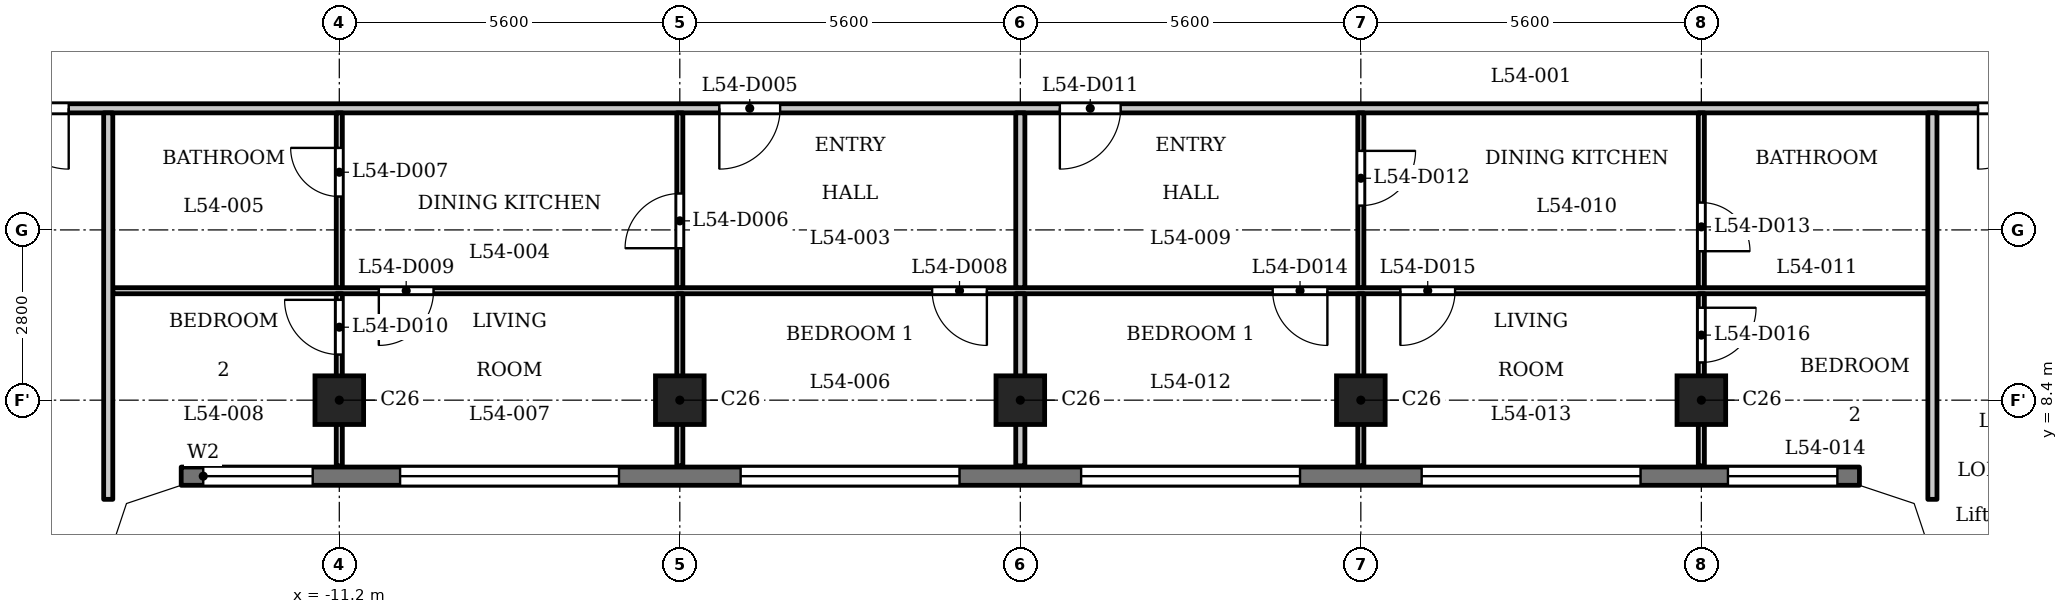
"""IFC4 building model, lengths in metres.
Left out: names, types, materials, properties, quantities, classifications, styles, units other than length and angle.
Written with IfcOpenShell. Run it as: python <this file> out.ifc"""

import sys

from ifc_helpers import new_model, si_unit, direction, frame, frame_2d, origin, origin_2d, place, context, subcontext, project, spatial, polyline, rectangle, outline, extrude, element, fill, save


model = new_model("IFC4")
c1 = context("Model", 3, precision=1e-05, world=origin(), true_north=direction((0.0, 1.0)))
c2 = subcontext(c1, "Body", "Model", "MODEL_VIEW")
j1 = project(units=[si_unit("LENGTHUNIT", "METRE"), si_unit("PLANEANGLEUNIT", "RADIAN")], contexts=[c1])
p1 = place(None, origin())
s1 = spatial("IfcSite", under=j1, at=p1, CompositionType="ELEMENT")
p2 = place(p1, origin())
s2 = spatial("IfcBuilding", under=s1, at=p2, CompositionType="ELEMENT")
p3 = place(p2, frame((0.0, 0.0, 209.9)))
s3 = spatial("IfcBuildingStorey", under=s2, at=p3, CompositionType="ELEMENT", Elevation=209.9)
for number, where, z_axis, x_axis in (
    (1, (-11.2, 8.4, 0.0), (0.0, 0.0, 1.0), (1.0, 0.0, 0.0)),
    (2, (-5.6, 8.4, 0.0), (0.0, 0.0, 1.0), (1.0, 0.0, 0.0)),
    (3, (0.0, 8.4, 0.0), (0.0, 0.0, 1.0), (1.0, 0.0, 0.0)),
    (4, (5.6, 8.4, 0.0), (0.0, 0.0, 1.0), (1.0, 0.0, 0.0)),
    (5, (11.2, 8.4, 0.0), (0.0, 0.0, 1.0), (1.0, 0.0, 0.0)),
):
    element("IfcColumn", number, at=place(p3, frame(where, z_axis=z_axis, x_axis=x_axis)), inside=s3, PredefinedType="COLUMN", context=c2, shape_type="SweptSolid", body=[
        extrude(rectangle(XDim=0.8, YDim=0.8, at=origin_2d()), origin(), (0.0, 0.0, 1.0), 3.5),
    ])
p4 = place(p3, frame((-13.8, 7.15, 0.0), z_axis=(0.0, 0.0, 1.0), x_axis=(1.0, 0.0, 0.0)))
e6 = element("IfcWall", 6, at=p4, inside=s3, PredefinedType="SOLIDWALL", context=c2, shape_type="SweptSolid", body=[
    extrude(rectangle(XDim=27.6, YDim=0.3, at=frame_2d((13.8, 0.0))), origin(), (0.0, 0.0, 1.0), 3.2),
])
p5 = place(p4, frame((0.363, 0.0, 0.9)))
e7 = element("IfcOpeningElement", 7, at=p5, cuts=e6, PredefinedType="OPENING", context=c2, shape_type="SweptSolid", body=[
    extrude(rectangle(XDim=1.8, YDim=1.25, at=frame_2d((0.9, 0.625))), frame((0.0, 0.16, 0.0), z_axis=(0.0, -1.0, 0.0), x_axis=(1.0, 0.0, 0.0)), (0.0, 0.0, 1.0), 0.32),
])
p6 = place(p4, frame((3.6, 0.0, 1.2)))
e8 = element("IfcOpeningElement", 8, at=p6, cuts=e6, PredefinedType="OPENING", context=c2, shape_type="SweptSolid", body=[
    extrude(rectangle(XDim=3.6, YDim=0.95, at=frame_2d((1.8, 0.475))), frame((0.0, 0.16, 0.0), z_axis=(0.0, -1.0, 0.0), x_axis=(1.0, 0.0, 0.0)), (0.0, 0.0, 1.0), 0.32),
])
p7 = place(p4, frame((9.2, 0.0, 1.2)))
e9 = element("IfcOpeningElement", 9, at=p7, cuts=e6, PredefinedType="OPENING", context=c2, shape_type="SweptSolid", body=[
    extrude(rectangle(XDim=3.6, YDim=0.95, at=frame_2d((1.8, 0.475))), frame((0.0, 0.16, 0.0), z_axis=(0.0, -1.0, 0.0), x_axis=(1.0, 0.0, 0.0)), (0.0, 0.0, 1.0), 0.32),
])
p8 = place(p4, frame((14.8, 0.0, 1.2)))
e10 = element("IfcOpeningElement", 10, at=p8, cuts=e6, PredefinedType="OPENING", context=c2, shape_type="SweptSolid", body=[
    extrude(rectangle(XDim=3.6, YDim=0.95, at=frame_2d((1.8, 0.475))), frame((0.0, 0.16, 0.0), z_axis=(0.0, -1.0, 0.0), x_axis=(1.0, 0.0, 0.0)), (0.0, 0.0, 1.0), 0.32),
])
p9 = place(p4, frame((20.4, 0.0, 1.2)))
e11 = element("IfcOpeningElement", 11, at=p9, cuts=e6, PredefinedType="OPENING", context=c2, shape_type="SweptSolid", body=[
    extrude(rectangle(XDim=3.6, YDim=0.95, at=frame_2d((1.8, 0.475))), frame((0.0, 0.16, 0.0), z_axis=(0.0, -1.0, 0.0), x_axis=(1.0, 0.0, 0.0)), (0.0, 0.0, 1.0), 0.32),
])
p10 = place(p4, frame((25.438, 0.0, 0.9)))
e12 = element("IfcOpeningElement", 12, at=p10, cuts=e6, PredefinedType="OPENING", context=c2, shape_type="SweptSolid", body=[
    extrude(rectangle(XDim=1.8, YDim=1.25, at=frame_2d((0.9, 0.625))), frame((0.0, 0.16, 0.0), z_axis=(0.0, -1.0, 0.0), x_axis=(1.0, 0.0, 0.0)), (0.0, 0.0, 1.0), 0.32),
])
p11 = place(p3, frame((-14.925, 10.2, 0.0), z_axis=(0.0, 0.0, 1.0), x_axis=(1.0, 0.0, 0.0)))
e13 = element("IfcWall", 13, at=p11, inside=s3, PredefinedType="PARTITIONING", context=c2, shape_type="SweptSolid", body=[
    extrude(rectangle(XDim=29.85, YDim=0.1, at=frame_2d((14.925, 0.0))), origin(), (0.0, 0.0, 1.0), 3.2),
])
p12 = place(p11, frame((13.475, 0.0, 0.0)))
e14 = element("IfcOpeningElement", 14, at=p12, cuts=e13, PredefinedType="OPENING", context=c2, shape_type="SweptSolid", body=[
    extrude(rectangle(XDim=0.9, YDim=2.1, at=frame_2d((0.45, 1.05))), frame((0.0, 0.06, 0.0), z_axis=(0.0, -1.0, 0.0), x_axis=(1.0, 0.0, 0.0)), (0.0, 0.0, 1.0), 0.12),
])
p13 = place(p11, frame((4.375, 0.0, 0.0)))
e15 = element("IfcOpeningElement", 15, at=p13, cuts=e13, PredefinedType="OPENING", context=c2, shape_type="SweptSolid", body=[
    extrude(rectangle(XDim=0.9, YDim=2.1, at=frame_2d((0.45, 1.05))), frame((0.0, 0.06, 0.0), z_axis=(0.0, -1.0, 0.0), x_axis=(1.0, 0.0, 0.0)), (0.0, 0.0, 1.0), 0.12),
])
p14 = place(p11, frame((19.075, 0.0, 0.0)))
e16 = element("IfcOpeningElement", 16, at=p14, cuts=e13, PredefinedType="OPENING", context=c2, shape_type="SweptSolid", body=[
    extrude(rectangle(XDim=0.9, YDim=2.1, at=frame_2d((0.45, 1.05))), frame((0.0, 0.06, 0.0), z_axis=(0.0, -1.0, 0.0), x_axis=(1.0, 0.0, 0.0)), (0.0, 0.0, 1.0), 0.12),
])
p15 = place(p11, frame((21.175, 0.0, 0.0)))
e17 = element("IfcOpeningElement", 17, at=p15, cuts=e13, PredefinedType="OPENING", context=c2, shape_type="SweptSolid", body=[
    extrude(rectangle(XDim=0.9, YDim=2.1, at=frame_2d((0.45, 1.05))), frame((0.0, 0.06, 0.0), z_axis=(0.0, -1.0, 0.0), x_axis=(1.0, 0.0, 0.0)), (0.0, 0.0, 1.0), 0.12),
])
p16 = place(p3, frame((-17.4, 13.2, 0.0), z_axis=(0.0, 0.0, 1.0), x_axis=(1.0, 0.0, 0.0)))
e18 = element("IfcWall", 18, at=p16, inside=s3, PredefinedType="PARTITIONING", context=c2, shape_type="SweptSolid", body=[
    extrude(rectangle(XDim=34.8, YDim=0.15, at=frame_2d((17.4, 0.0))), origin(), (0.0, 0.0, 1.0), 3.2),
])
p17 = place(p16, frame((0.75, 0.0, 0.0)))
e19 = element("IfcOpeningElement", 19, at=p17, cuts=e18, PredefinedType="OPENING", context=c2, shape_type="SweptSolid", body=[
    extrude(rectangle(XDim=1.0, YDim=2.1, at=frame_2d((0.5, 1.05))), frame((0.0, 0.085, 0.0), z_axis=(0.0, -1.0, 0.0), x_axis=(1.0, 0.0, 0.0)), (0.0, 0.0, 1.0), 0.17),
])
p18 = place(p16, frame((33.15, 0.0, 0.0)))
e20 = element("IfcOpeningElement", 20, at=p18, cuts=e18, PredefinedType="OPENING", context=c2, shape_type="SweptSolid", body=[
    extrude(rectangle(XDim=1.0, YDim=2.1, at=frame_2d((0.5, 1.05))), frame((0.0, 0.085, 0.0), z_axis=(0.0, -1.0, 0.0), x_axis=(1.0, 0.0, 0.0)), (0.0, 0.0, 1.0), 0.17),
])
p19 = place(p16, frame((12.45, 0.0, 0.0)))
e21 = element("IfcOpeningElement", 21, at=p19, cuts=e18, PredefinedType="OPENING", context=c2, shape_type="SweptSolid", body=[
    extrude(rectangle(XDim=1.0, YDim=2.1, at=frame_2d((0.5, 1.05))), frame((0.0, 0.085, 0.0), z_axis=(0.0, -1.0, 0.0), x_axis=(1.0, 0.0, 0.0)), (0.0, 0.0, 1.0), 0.17),
])
p20 = place(p16, frame((18.05, 0.0, 0.0)))
e22 = element("IfcOpeningElement", 22, at=p20, cuts=e18, PredefinedType="OPENING", context=c2, shape_type="SweptSolid", body=[
    extrude(rectangle(XDim=1.0, YDim=2.1, at=frame_2d((0.5, 1.05))), frame((0.0, 0.085, 0.0), z_axis=(0.0, -1.0, 0.0), x_axis=(1.0, 0.0, 0.0)), (0.0, 0.0, 1.0), 0.17),
])
p21 = place(p3, frame((-15.0, 6.769, 0.0), z_axis=(0.0, 0.0, 1.0), x_axis=(0.0, 1.0, 0.0)))
e23 = element("IfcWall", 23, at=p21, inside=s3, PredefinedType="PARTITIONING", context=c2, shape_type="SweptSolid", body=[
    extrude(rectangle(XDim=6.356, YDim=0.15, at=frame_2d((3.178, 0.0))), origin(), (0.0, 0.0, 1.0), 3.2),
])
p22 = place(p3, frame((-11.2, 7.32, 0.0), z_axis=(0.0, 0.0, 1.0), x_axis=(0.0, 1.0, 0.0)))
e24 = element("IfcWall", 24, at=p22, inside=s3, PredefinedType="PARTITIONING", context=c2, shape_type="SweptSolid", body=[
    extrude(rectangle(XDim=2.83, YDim=0.1, at=frame_2d((1.415, 0.0))), origin(), (0.0, 0.0, 1.0), 3.2),
])
p23 = place(p22, frame((1.83, 0.0, 0.0)))
e25 = element("IfcOpeningElement", 25, at=p23, cuts=e24, PredefinedType="OPENING", context=c2, shape_type="SweptSolid", body=[
    extrude(rectangle(XDim=0.9, YDim=2.1, at=frame_2d((0.45, 1.05))), frame((0.0, 0.06, 0.0), z_axis=(0.0, -1.0, 0.0), x_axis=(1.0, 0.0, 0.0)), (0.0, 0.0, 1.0), 0.12),
])
p24 = place(p3, frame((-11.2, 10.25, 0.0), z_axis=(0.0, 0.0, 1.0), x_axis=(0.0, 1.0, 0.0)))
e26 = element("IfcWall", 26, at=p24, inside=s3, PredefinedType="PARTITIONING", context=c2, shape_type="SweptSolid", body=[
    extrude(rectangle(XDim=2.875, YDim=0.1, at=frame_2d((1.438, 0.0))), origin(), (0.0, 0.0, 1.0), 3.2),
])
p25 = place(p24, frame((1.499, 0.0, 0.0)))
e27 = element("IfcOpeningElement", 27, at=p25, cuts=e26, PredefinedType="OPENING", context=c2, shape_type="SweptSolid", body=[
    extrude(rectangle(XDim=0.8, YDim=2.1, at=frame_2d((0.4, 1.05))), frame((0.0, 0.06, 0.0), z_axis=(0.0, -1.0, 0.0), x_axis=(1.0, 0.0, 0.0)), (0.0, 0.0, 1.0), 0.12),
])
p26 = place(p3, frame((-5.6, 7.32, 0.0), z_axis=(0.0, 0.0, 1.0), x_axis=(0.0, 1.0, 0.0)))
e28 = element("IfcWall", 28, at=p26, inside=s3, PredefinedType="PARTITIONING", context=c2, shape_type="SweptSolid", body=[
    extrude(rectangle(XDim=2.83, YDim=0.1, at=frame_2d((1.415, 0.0))), origin(), (0.0, 0.0, 1.0), 3.2),
])
p27 = place(p3, frame((-5.6, 10.25, 0.0), z_axis=(0.0, 0.0, 1.0), x_axis=(0.0, 1.0, 0.0)))
e29 = element("IfcWall", 29, at=p27, inside=s3, PredefinedType="PARTITIONING", context=c2, shape_type="SweptSolid", body=[
    extrude(rectangle(XDim=2.875, YDim=0.1, at=frame_2d((1.438, 0.0))), origin(), (0.0, 0.0, 1.0), 3.2),
])
p28 = place(p27, frame((0.649, 0.0, 0.0)))
e30 = element("IfcOpeningElement", 30, at=p28, cuts=e29, PredefinedType="OPENING", context=c2, shape_type="SweptSolid", body=[
    extrude(rectangle(XDim=0.9, YDim=2.1, at=frame_2d((0.45, 1.05))), frame((0.0, 0.06, 0.0), z_axis=(0.0, -1.0, 0.0), x_axis=(1.0, 0.0, 0.0)), (0.0, 0.0, 1.0), 0.12),
])
p29 = place(p3, frame((0.0, 7.32, 0.0), z_axis=(0.0, 0.0, 1.0), x_axis=(0.0, 1.0, 0.0)))
e31 = element("IfcWall", 31, at=p29, inside=s3, PredefinedType="PARTITIONING", context=c2, shape_type="SweptSolid", body=[
    extrude(rectangle(XDim=2.83, YDim=0.15, at=frame_2d((1.415, 0.0))), origin(), (0.0, 0.0, 1.0), 3.2),
])
p30 = place(p3, frame((0.0, 10.25, 0.0), z_axis=(0.0, 0.0, 1.0), x_axis=(0.0, 1.0, 0.0)))
e32 = element("IfcWall", 32, at=p30, inside=s3, PredefinedType="PARTITIONING", context=c2, shape_type="SweptSolid", body=[
    extrude(rectangle(XDim=2.875, YDim=0.15, at=frame_2d((1.438, 0.0))), origin(), (0.0, 0.0, 1.0), 3.2),
])
p31 = place(p3, frame((5.6, 7.32, 0.0), z_axis=(0.0, 0.0, 1.0), x_axis=(0.0, 1.0, 0.0)))
e33 = element("IfcWall", 33, at=p31, inside=s3, PredefinedType="PARTITIONING", context=c2, shape_type="SweptSolid", body=[
    extrude(rectangle(XDim=2.83, YDim=0.1, at=frame_2d((1.415, 0.0))), origin(), (0.0, 0.0, 1.0), 3.2),
])
p32 = place(p3, frame((5.6, 10.25, 0.0), z_axis=(0.0, 0.0, 1.0), x_axis=(0.0, 1.0, 0.0)))
e34 = element("IfcWall", 34, at=p32, inside=s3, PredefinedType="PARTITIONING", context=c2, shape_type="SweptSolid", body=[
    extrude(rectangle(XDim=2.875, YDim=0.1, at=frame_2d((1.438, 0.0))), origin(), (0.0, 0.0, 1.0), 3.2),
])
p33 = place(p32, frame((1.35, 0.0, 0.0)))
e35 = element("IfcOpeningElement", 35, at=p33, cuts=e34, PredefinedType="OPENING", context=c2, shape_type="SweptSolid", body=[
    extrude(rectangle(XDim=0.9, YDim=2.1, at=frame_2d((0.45, 1.05))), frame((0.0, 0.06, 0.0), z_axis=(0.0, -1.0, 0.0), x_axis=(1.0, 0.0, 0.0)), (0.0, 0.0, 1.0), 0.12),
])
p34 = place(p3, frame((11.2, 7.32, 0.0), z_axis=(0.0, 0.0, 1.0), x_axis=(0.0, 1.0, 0.0)))
e36 = element("IfcWall", 36, at=p34, inside=s3, PredefinedType="PARTITIONING", context=c2, shape_type="SweptSolid", body=[
    extrude(rectangle(XDim=2.83, YDim=0.1, at=frame_2d((1.415, 0.0))), origin(), (0.0, 0.0, 1.0), 3.2),
])
p35 = place(p34, frame((1.7, 0.0, 0.0)))
e37 = element("IfcOpeningElement", 37, at=p35, cuts=e36, PredefinedType="OPENING", context=c2, shape_type="SweptSolid", body=[
    extrude(rectangle(XDim=0.9, YDim=2.1, at=frame_2d((0.45, 1.05))), frame((0.0, 0.06, 0.0), z_axis=(0.0, -1.0, 0.0), x_axis=(1.0, 0.0, 0.0)), (0.0, 0.0, 1.0), 0.12),
])
p36 = place(p3, frame((11.2, 10.25, 0.0), z_axis=(0.0, 0.0, 1.0), x_axis=(0.0, 1.0, 0.0)))
e38 = element("IfcWall", 38, at=p36, inside=s3, PredefinedType="PARTITIONING", context=c2, shape_type="SweptSolid", body=[
    extrude(rectangle(XDim=2.875, YDim=0.1, at=frame_2d((1.438, 0.0))), origin(), (0.0, 0.0, 1.0), 3.2),
])
p37 = place(p36, frame((0.6, 0.0, 0.0)))
e39 = element("IfcOpeningElement", 39, at=p37, cuts=e38, PredefinedType="OPENING", context=c2, shape_type="SweptSolid", body=[
    extrude(rectangle(XDim=0.8, YDim=2.1, at=frame_2d((0.4, 1.05))), frame((0.0, 0.06, 0.0), z_axis=(0.0, -1.0, 0.0), x_axis=(1.0, 0.0, 0.0)), (0.0, 0.0, 1.0), 0.12),
])
p38 = place(p3, frame((15.0, 6.769, 0.0), z_axis=(0.0, 0.0, 1.0), x_axis=(0.0, 1.0, 0.0)))
e40 = element("IfcWall", 40, at=p38, inside=s3, PredefinedType="PARTITIONING", context=c2, shape_type="SweptSolid", body=[
    extrude(rectangle(XDim=6.356, YDim=0.15, at=frame_2d((3.178, 0.0))), origin(), (0.0, 0.0, 1.0), 3.2),
])
p39 = place(p3, origin())
e41 = element("IfcWall", 41, at=p39, inside=s3, PredefinedType="SOLIDWALL", context=c2, shape_type="SweptSolid", body=[
    extrude(outline(polyline([(-13.849, 7.3), (-14.937, 6.937), (-15.3, 5.849), (-15.3, 5.8), (-15.0, 5.8), (-14.7, 6.7), (-13.8, 7.0), (-13.8, 7.3), (-13.849, 7.3)])), origin(), (0.0, 0.0, 1.0), 3.2),
])
e42 = element("IfcWall", 42, at=p39, inside=s3, PredefinedType="SOLIDWALL", context=c2, shape_type="SweptSolid", body=[
    extrude(outline(polyline([(14.937, 6.937), (13.849, 7.3), (13.8, 7.3), (13.8, 7.0), (14.7, 6.7), (15.0, 5.8), (15.3, 5.8), (15.3, 5.849), (14.937, 6.937)])), origin(), (0.0, 0.0, 1.0), 3.2),
])
p40 = place(p17, origin())
e43 = element("IfcDoor", 43, at=p40, inside=s3, OperationType="SINGLE_SWING_RIGHT", PredefinedType="DOOR", context=c2, shape_type="SweptSolid", body=[
    extrude(rectangle(XDim=1.0, YDim=2.1, at=frame_2d((0.5, 1.05))), frame((0.0, 0.025, 0.0), z_axis=(0.0, -1.0, 0.0), x_axis=(1.0, 0.0, 0.0)), (0.0, 0.0, 1.0), 0.05),
])
fill(e19, e43)
p41 = place(p18, origin())
e44 = element("IfcDoor", 44, at=p41, inside=s3, OperationType="SINGLE_SWING_LEFT", PredefinedType="DOOR", context=c2, shape_type="SweptSolid", body=[
    extrude(rectangle(XDim=1.0, YDim=2.1, at=frame_2d((0.5, 1.05))), frame((0.0, 0.025, 0.0), z_axis=(0.0, -1.0, 0.0), x_axis=(1.0, 0.0, 0.0)), (0.0, 0.0, 1.0), 0.05),
])
fill(e20, e44)
p42 = place(p19, origin())
e45 = element("IfcDoor", 45, at=p42, inside=s3, OperationType="SINGLE_SWING_LEFT", PredefinedType="DOOR", context=c2, shape_type="SweptSolid", body=[
    extrude(rectangle(XDim=1.0, YDim=2.1, at=frame_2d((0.5, 1.05))), frame((0.0, 0.025, 0.0), z_axis=(0.0, -1.0, 0.0), x_axis=(1.0, 0.0, 0.0)), (0.0, 0.0, 1.0), 0.05),
])
fill(e21, e45)
p43 = place(p28, origin())
e46 = element("IfcDoor", 46, at=p43, inside=s3, OperationType="SINGLE_SWING_RIGHT", PredefinedType="DOOR", context=c2, shape_type="SweptSolid", body=[
    extrude(rectangle(XDim=0.9, YDim=2.1, at=frame_2d((0.45, 1.05))), frame((0.0, 0.025, 0.0), z_axis=(0.0, -1.0, 0.0), x_axis=(1.0, 0.0, 0.0)), (0.0, 0.0, 1.0), 0.05),
])
fill(e30, e46)
p44 = place(p25, origin())
e47 = element("IfcDoor", 47, at=p44, inside=s3, OperationType="SINGLE_SWING_LEFT", PredefinedType="DOOR", context=c2, shape_type="SweptSolid", body=[
    extrude(rectangle(XDim=0.8, YDim=2.1, at=frame_2d((0.4, 1.05))), frame((0.0, 0.025, 0.0), z_axis=(0.0, -1.0, 0.0), x_axis=(1.0, 0.0, 0.0)), (0.0, 0.0, 1.0), 0.05),
])
fill(e27, e47)
p45 = place(p12, origin())
e48 = element("IfcDoor", 48, at=p45, inside=s3, OperationType="SINGLE_SWING_RIGHT", PredefinedType="DOOR", context=c2, shape_type="SweptSolid", body=[
    extrude(rectangle(XDim=0.9, YDim=2.1, at=frame_2d((0.45, 1.05))), frame((0.0, 0.025, 0.0), z_axis=(0.0, -1.0, 0.0), x_axis=(1.0, 0.0, 0.0)), (0.0, 0.0, 1.0), 0.05),
])
fill(e14, e48)
p46 = place(p13, origin())
e49 = element("IfcDoor", 49, at=p46, inside=s3, OperationType="SINGLE_SWING_LEFT", PredefinedType="DOOR", context=c2, shape_type="SweptSolid", body=[
    extrude(rectangle(XDim=0.9, YDim=2.1, at=frame_2d((0.45, 1.05))), frame((0.0, 0.025, 0.0), z_axis=(0.0, -1.0, 0.0), x_axis=(1.0, 0.0, 0.0)), (0.0, 0.0, 1.0), 0.05),
])
fill(e15, e49)
p47 = place(p23, origin())
e50 = element("IfcDoor", 50, at=p47, inside=s3, OperationType="SINGLE_SWING_LEFT", PredefinedType="DOOR", context=c2, shape_type="SweptSolid", body=[
    extrude(rectangle(XDim=0.9, YDim=2.1, at=frame_2d((0.45, 1.05))), frame((0.0, 0.025, 0.0), z_axis=(0.0, -1.0, 0.0), x_axis=(1.0, 0.0, 0.0)), (0.0, 0.0, 1.0), 0.05),
])
fill(e25, e50)
p48 = place(p20, origin())
e51 = element("IfcDoor", 51, at=p48, inside=s3, OperationType="SINGLE_SWING_LEFT", PredefinedType="DOOR", context=c2, shape_type="SweptSolid", body=[
    extrude(rectangle(XDim=1.0, YDim=2.1, at=frame_2d((0.5, 1.05))), frame((0.0, 0.025, 0.0), z_axis=(0.0, -1.0, 0.0), x_axis=(1.0, 0.0, 0.0)), (0.0, 0.0, 1.0), 0.05),
])
fill(e22, e51)
p49 = place(p33, origin())
e52 = element("IfcDoor", 52, at=p49, inside=s3, OperationType="SINGLE_SWING_RIGHT", PredefinedType="DOOR", context=c2, shape_type="SweptSolid", body=[
    extrude(rectangle(XDim=0.9, YDim=2.1, at=frame_2d((0.45, 1.05))), frame((0.0, 0.025, 0.0), z_axis=(0.0, -1.0, 0.0), x_axis=(1.0, 0.0, 0.0)), (0.0, 0.0, 1.0), 0.05),
])
fill(e35, e52)
p50 = place(p37, origin())
e53 = element("IfcDoor", 53, at=p50, inside=s3, OperationType="SINGLE_SWING_LEFT", PredefinedType="DOOR", context=c2, shape_type="SweptSolid", body=[
    extrude(rectangle(XDim=0.8, YDim=2.1, at=frame_2d((0.4, 1.05))), frame((0.0, 0.025, 0.0), z_axis=(0.0, -1.0, 0.0), x_axis=(1.0, 0.0, 0.0)), (0.0, 0.0, 1.0), 0.05),
])
fill(e39, e53)
p51 = place(p14, origin())
e54 = element("IfcDoor", 54, at=p51, inside=s3, OperationType="SINGLE_SWING_RIGHT", PredefinedType="DOOR", context=c2, shape_type="SweptSolid", body=[
    extrude(rectangle(XDim=0.9, YDim=2.1, at=frame_2d((0.45, 1.05))), frame((0.0, 0.025, 0.0), z_axis=(0.0, -1.0, 0.0), x_axis=(1.0, 0.0, 0.0)), (0.0, 0.0, 1.0), 0.05),
])
fill(e16, e54)
p52 = place(p15, origin())
e55 = element("IfcDoor", 55, at=p52, inside=s3, OperationType="SINGLE_SWING_LEFT", PredefinedType="DOOR", context=c2, shape_type="SweptSolid", body=[
    extrude(rectangle(XDim=0.9, YDim=2.1, at=frame_2d((0.45, 1.05))), frame((0.0, 0.025, 0.0), z_axis=(0.0, -1.0, 0.0), x_axis=(1.0, 0.0, 0.0)), (0.0, 0.0, 1.0), 0.05),
])
fill(e17, e55)
p53 = place(p35, origin())
e56 = element("IfcDoor", 56, at=p53, inside=s3, OperationType="SINGLE_SWING_RIGHT", PredefinedType="DOOR", context=c2, shape_type="SweptSolid", body=[
    extrude(rectangle(XDim=0.9, YDim=2.1, at=frame_2d((0.45, 1.05))), frame((0.0, 0.025, 0.0), z_axis=(0.0, -1.0, 0.0), x_axis=(1.0, 0.0, 0.0)), (0.0, 0.0, 1.0), 0.05),
])
fill(e37, e56)
p54 = place(p5, origin())
e57 = element("IfcWindow", 57, at=p54, inside=s3, PartitioningType="SINGLE_PANEL", PredefinedType="WINDOW", context=c2, shape_type="SweptSolid", body=[
    extrude(rectangle(XDim=1.8, YDim=1.25, at=frame_2d((0.9, 0.625))), frame((0.0, 0.03, 0.0), z_axis=(0.0, -1.0, 0.0), x_axis=(1.0, 0.0, 0.0)), (0.0, 0.0, 1.0), 0.06),
])
fill(e7, e57)
p55 = place(p6, origin())
e58 = element("IfcWindow", 58, at=p55, inside=s3, PartitioningType="SINGLE_PANEL", PredefinedType="WINDOW", context=c2, shape_type="SweptSolid", body=[
    extrude(rectangle(XDim=3.6, YDim=0.95, at=frame_2d((1.8, 0.475))), frame((0.0, 0.03, 0.0), z_axis=(0.0, -1.0, 0.0), x_axis=(1.0, 0.0, 0.0)), (0.0, 0.0, 1.0), 0.06),
])
fill(e8, e58)
p56 = place(p7, origin())
e59 = element("IfcWindow", 59, at=p56, inside=s3, PartitioningType="SINGLE_PANEL", PredefinedType="WINDOW", context=c2, shape_type="SweptSolid", body=[
    extrude(rectangle(XDim=3.6, YDim=0.95, at=frame_2d((1.8, 0.475))), frame((0.0, 0.03, 0.0), z_axis=(0.0, -1.0, 0.0), x_axis=(1.0, 0.0, 0.0)), (0.0, 0.0, 1.0), 0.06),
])
fill(e9, e59)
p57 = place(p8, origin())
e60 = element("IfcWindow", 60, at=p57, inside=s3, PartitioningType="SINGLE_PANEL", PredefinedType="WINDOW", context=c2, shape_type="SweptSolid", body=[
    extrude(rectangle(XDim=3.6, YDim=0.95, at=frame_2d((1.8, 0.475))), frame((0.0, 0.03, 0.0), z_axis=(0.0, -1.0, 0.0), x_axis=(1.0, 0.0, 0.0)), (0.0, 0.0, 1.0), 0.06),
])
fill(e10, e60)
p58 = place(p9, origin())
e61 = element("IfcWindow", 61, at=p58, inside=s3, PartitioningType="SINGLE_PANEL", PredefinedType="WINDOW", context=c2, shape_type="SweptSolid", body=[
    extrude(rectangle(XDim=3.6, YDim=0.95, at=frame_2d((1.8, 0.475))), frame((0.0, 0.03, 0.0), z_axis=(0.0, -1.0, 0.0), x_axis=(1.0, 0.0, 0.0)), (0.0, 0.0, 1.0), 0.06),
])
fill(e11, e61)
p59 = place(p10, origin())
e62 = element("IfcWindow", 62, at=p59, inside=s3, PartitioningType="SINGLE_PANEL", PredefinedType="WINDOW", context=c2, shape_type="SweptSolid", body=[
    extrude(rectangle(XDim=1.8, YDim=1.25, at=frame_2d((0.9, 0.625))), frame((0.0, 0.03, 0.0), z_axis=(0.0, -1.0, 0.0), x_axis=(1.0, 0.0, 0.0)), (0.0, 0.0, 1.0), 0.06),
])
fill(e12, e62)
save(model, sys.argv[1])
